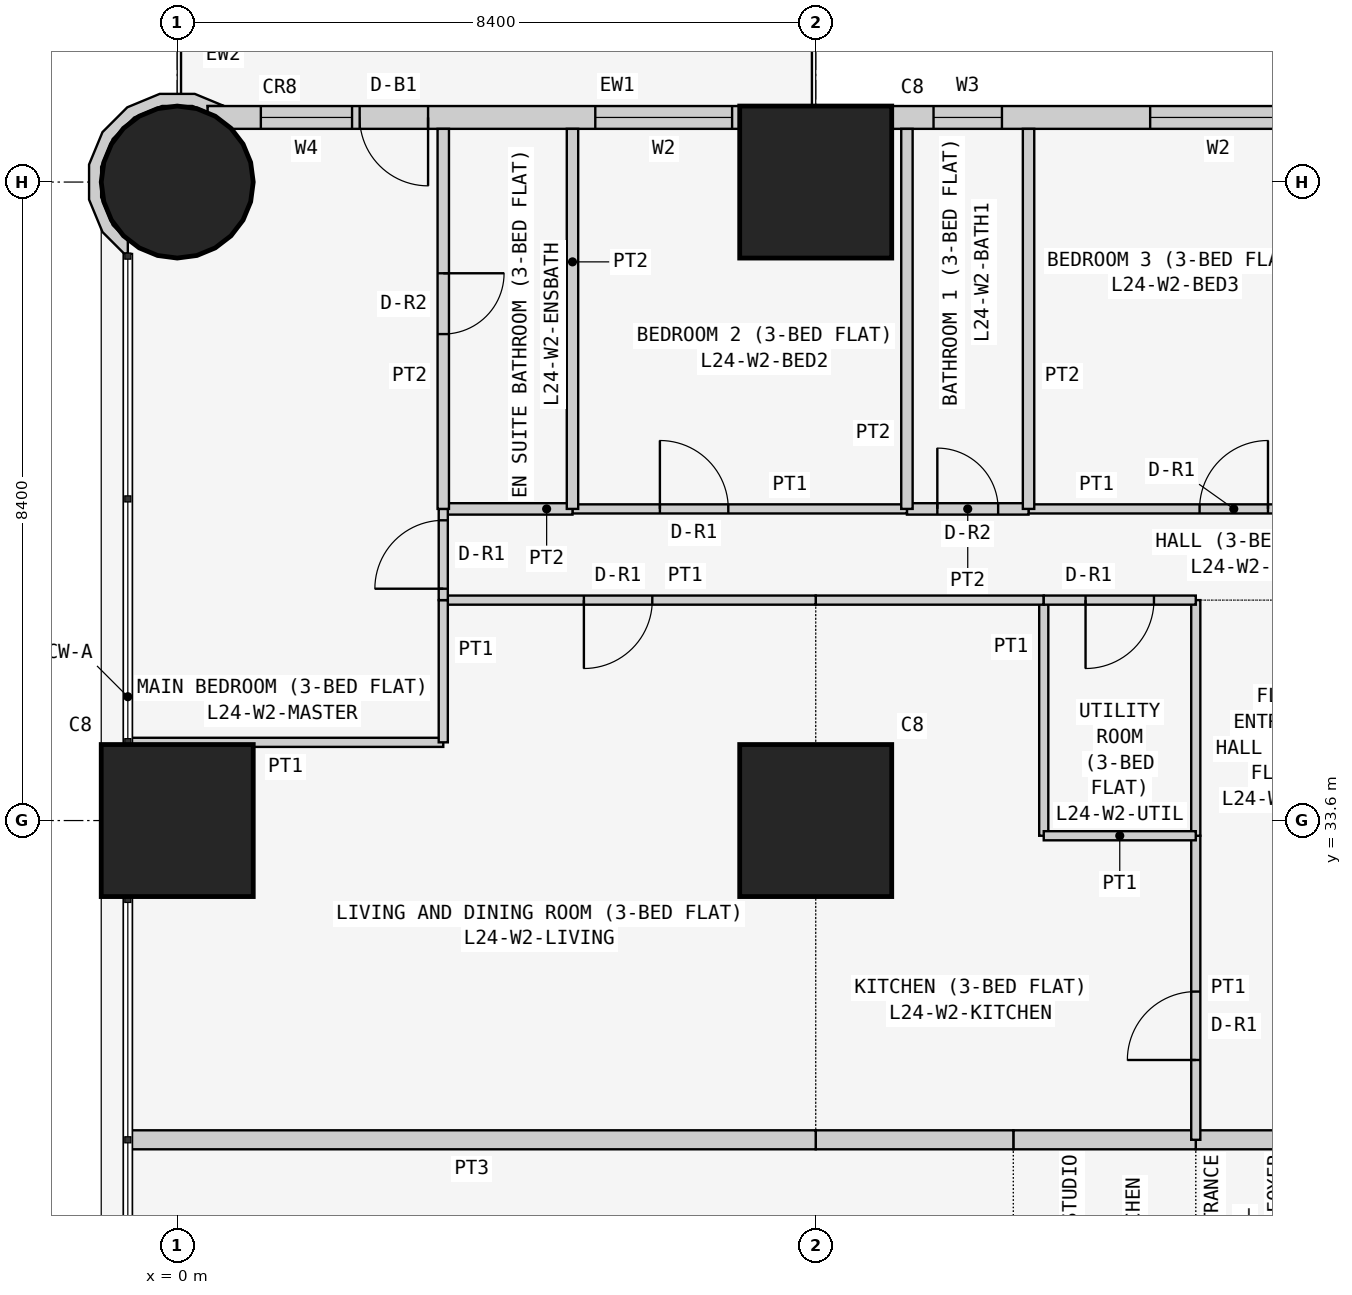
"""IFC4 building model, lengths in metres.
Left out: names, types, materials, properties, quantities, classifications, styles, units other than length and angle.
Written with IfcOpenShell. Run it as: python <this file> out.ifc"""

import sys

from ifc_helpers import new_model, si_unit, direction, frame, frame_2d, origin, origin_2d, place, context, subcontext, project, spatial, polyline, rectangle, circle, outline, extrude, element, fill, save


model = new_model("IFC4")
c1 = context("Model", 3, precision=1e-05, world=origin(), true_north=direction((0.0, 1.0)))
c2 = subcontext(c1, "Body", "Model", "MODEL_VIEW")
j1 = project(units=[si_unit("LENGTHUNIT", "METRE"), si_unit("PLANEANGLEUNIT", "RADIAN")], contexts=[c1])
p1 = place(None, origin())
s1 = spatial("IfcSite", under=j1, at=p1, CompositionType="ELEMENT")
p2 = place(p1, origin())
s2 = spatial("IfcBuilding", under=s1, at=p2, CompositionType="ELEMENT")
p3 = place(p2, frame((0.0, 0.0, 95.7)))
s3 = spatial("IfcBuildingStorey", under=s2, at=p3, CompositionType="ELEMENT", Elevation=95.7)
p4 = place(p3, frame((0.0, 33.6, 0.0), z_axis=(0.0, 0.0, 1.0), x_axis=(1.0, 0.0, 0.0)))
e1 = element("IfcColumn", 1, at=p4, inside=s3, PredefinedType="COLUMN", context=c2, shape_type="SweptSolid", body=[
    extrude(rectangle(XDim=2.0, YDim=2.0, at=origin_2d()), origin(), (0.0, 0.0, 1.0), 3.6),
])
p5 = place(p3, frame((0.0, 42.0, 0.0), z_axis=(0.0, 0.0, 1.0), x_axis=(1.0, 0.0, 0.0)))
e2 = element("IfcColumn", 2, at=p5, inside=s3, PredefinedType="COLUMN", context=c2, shape_type="SweptSolid", body=[
    extrude(circle(Radius=1.0, at=origin_2d()), origin(), (0.0, 0.0, 1.0), 3.6),
])
for number, where, z_axis, x_axis in (
    (3, (8.4, 33.6, 0.0), (0.0, 0.0, 1.0), (1.0, 0.0, 0.0)),
    (4, (8.4, 42.0, 0.0), (0.0, 0.0, 1.0), (1.0, 0.0, 0.0)),
):
    element("IfcColumn", number, at=place(p3, frame(where, z_axis=z_axis, x_axis=x_axis)), inside=s3, PredefinedType="COLUMN", context=c2, shape_type="SweptSolid", body=[
        extrude(rectangle(XDim=2.0, YDim=2.0, at=origin_2d()), origin(), (0.0, 0.0, 1.0), 3.6),
    ])
p6 = place(p3, frame((15.8, 42.85, 0.0), z_axis=(0.0, 0.0, 1.0), x_axis=(-1.0, 0.0, 0.0)))
e5 = element("IfcWall", 5, at=p6, inside=s3, PredefinedType="SOLIDWALL", context=c2, shape_type="SweptSolid", body=[
    extrude(rectangle(XDim=15.4, YDim=0.3, at=frame_2d((7.7, 0.0))), origin(), (0.0, 0.0, 1.0), 3.45),
])
p7 = place(p6, frame((1.2, 0.0, 0.9)))
e6 = element("IfcOpeningElement", 6, at=p7, cuts=e5, PredefinedType="OPENING", context=c2, shape_type="SweptSolid", body=[
    extrude(rectangle(XDim=1.8, YDim=1.5, at=frame_2d((0.9, 0.75))), frame((0.0, 0.16, 0.0), z_axis=(0.0, -1.0, 0.0), x_axis=(1.0, 0.0, 0.0)), (0.0, 0.0, 1.0), 0.32),
])
p8 = place(p6, frame((4.95, 0.0, 1.5)))
e7 = element("IfcOpeningElement", 7, at=p8, cuts=e5, PredefinedType="OPENING", context=c2, shape_type="SweptSolid", body=[
    extrude(rectangle(XDim=0.9, YDim=0.7, at=frame_2d((0.45, 0.35))), frame((0.0, 0.16, 0.0), z_axis=(0.0, -1.0, 0.0), x_axis=(1.0, 0.0, 0.0)), (0.0, 0.0, 1.0), 0.32),
])
p9 = place(p6, frame((8.5, 0.0, 0.9)))
e8 = element("IfcOpeningElement", 8, at=p9, cuts=e5, PredefinedType="OPENING", context=c2, shape_type="SweptSolid", body=[
    extrude(rectangle(XDim=1.8, YDim=1.5, at=frame_2d((0.9, 0.75))), frame((0.0, 0.16, 0.0), z_axis=(0.0, -1.0, 0.0), x_axis=(1.0, 0.0, 0.0)), (0.0, 0.0, 1.0), 0.32),
])
p10 = place(p6, frame((12.5, 0.0, 0.0)))
e9 = element("IfcOpeningElement", 9, at=p10, cuts=e5, PredefinedType="OPENING", context=c2, shape_type="SweptSolid", body=[
    extrude(rectangle(XDim=0.9, YDim=2.4, at=frame_2d((0.45, 1.2))), frame((0.0, 0.16, 0.0), z_axis=(0.0, -1.0, 0.0), x_axis=(1.0, 0.0, 0.0)), (0.0, 0.0, 1.0), 0.32),
])
p11 = place(p6, frame((13.5, 0.0, 0.9)))
e10 = element("IfcOpeningElement", 10, at=p11, cuts=e5, PredefinedType="OPENING", context=c2, shape_type="SweptSolid", body=[
    extrude(rectangle(XDim=1.2, YDim=1.5, at=frame_2d((0.6, 0.75))), frame((0.0, 0.16, 0.0), z_axis=(0.0, -1.0, 0.0), x_axis=(1.0, 0.0, 0.0)), (0.0, 0.0, 1.0), 0.32),
])
p12 = place(p3, frame((0.567, 42.919, 0.0), z_axis=(0.0, 0.0, 1.0), x_axis=(-0.831199417842, 0.555974394895, 0.0)))
e11 = element("IfcWall", 11, at=p12, inside=s3, PredefinedType="SOLIDWALL", context=c2, shape_type="SweptSolid", body=[
    extrude(outline(polyline([(0.004, -0.095), (0.413, -0.013), (0.797, 0.243), (1.053, 0.627), (1.143, 1.08), (1.053, 1.532), (0.796, 1.916), (0.412, 2.172), (0.017, 2.251), (-0.023, 2.224), (0.075, 2.077), (0.351, 2.022), (0.682, 1.801), (0.903, 1.47), (0.981, 1.08), (0.903, 0.689), (0.682, 0.358), (0.351, 0.137), (0.126, 0.092), (0.184, 0.026), (0.004, -0.095)])), origin(), (0.0, 0.0, 1.0), 3.45),
])
p13 = place(p3, frame((15.675, 29.4, 0.0), z_axis=(0.0, 0.0, 1.0), x_axis=(-1.0, 0.0, 0.0)))
e12 = element("IfcWall", 12, at=p13, inside=s3, PredefinedType="PARTITIONING", context=c2, shape_type="SweptSolid", body=[
    extrude(rectangle(XDim=2.275, YDim=0.25, at=frame_2d((1.138, 0.0))), origin(), (0.0, 0.0, 1.0), 3.45),
])
p14 = place(p3, frame((13.4, 29.4, 0.0), z_axis=(0.0, 0.0, 1.0), x_axis=(-1.0, 0.0, 0.0)))
e13 = element("IfcWall", 13, at=p14, inside=s3, PredefinedType="PARTITIONING", context=c2, shape_type="SweptSolid", body=[
    extrude(rectangle(XDim=2.4, YDim=0.25, at=frame_2d((1.2, 0.0))), origin(), (0.0, 0.0, 1.0), 3.45),
])
p15 = place(p3, frame((11.0, 29.4, 0.0), z_axis=(0.0, 0.0, 1.0), x_axis=(-1.0, 0.0, 0.0)))
e14 = element("IfcWall", 14, at=p15, inside=s3, PredefinedType="PARTITIONING", context=c2, shape_type="SweptSolid", body=[
    extrude(rectangle(XDim=2.6, YDim=0.25, at=frame_2d((1.3, 0.0))), origin(), (0.0, 0.0, 1.0), 3.45),
])
p16 = place(p3, frame((8.4, 29.4, 0.0), z_axis=(0.0, 0.0, 1.0), x_axis=(-1.0, 0.0, 0.0)))
e15 = element("IfcWall", 15, at=p16, inside=s3, PredefinedType="PARTITIONING", context=c2, shape_type="SweptSolid", body=[
    extrude(rectangle(XDim=9.05, YDim=0.25, at=frame_2d((4.525, 0.0))), origin(), (0.0, 0.0, 1.0), 3.45),
])
p17 = place(p3, frame((13.4, 29.4, 0.0), z_axis=(0.0, 0.0, 1.0), x_axis=(0.0, 1.0, 0.0)))
e16 = element("IfcWall", 16, at=p17, inside=s3, PredefinedType="PARTITIONING", context=c2, shape_type="SweptSolid", body=[
    extrude(rectangle(XDim=4.0, YDim=0.12, at=frame_2d((2.0, 0.0))), origin(), (0.0, 0.0, 1.0), 3.45),
])
p18 = place(p17, frame((1.05, 0.0, 0.0)))
e17 = element("IfcOpeningElement", 17, at=p18, cuts=e16, PredefinedType="OPENING", context=c2, shape_type="SweptSolid", body=[
    extrude(rectangle(XDim=0.9, YDim=2.1, at=frame_2d((0.45, 1.05))), frame((0.0, 0.07, 0.0), z_axis=(0.0, -1.0, 0.0), x_axis=(1.0, 0.0, 0.0)), (0.0, 0.0, 1.0), 0.14),
])
for number, where, z_axis, x_axis in (
    (18, (13.4, 33.4, 0.0), (0.0, 0.0, 1.0), (0.0, 1.0, 0.0)),
    (19, (11.4, 36.5, 0.0), (0.0, 0.0, 1.0), (0.0, -1.0, 0.0)),
):
    element("IfcWall", number, at=place(p3, frame(where, z_axis=z_axis, x_axis=x_axis)), inside=s3, PredefinedType="PARTITIONING", context=c2, shape_type="SweptSolid", body=[
        extrude(rectangle(XDim=3.1, YDim=0.12, at=frame_2d((1.55, 0.0))), origin(), (0.0, 0.0, 1.0), 3.45),
    ])
p19 = place(p3, frame((11.4, 33.4, 0.0), z_axis=(0.0, 0.0, 1.0), x_axis=(1.0, 0.0, 0.0)))
e20 = element("IfcWall", 20, at=p19, inside=s3, PredefinedType="PARTITIONING", context=c2, shape_type="SweptSolid", body=[
    extrude(rectangle(XDim=2.0, YDim=0.12, at=frame_2d((1.0, 0.0))), origin(), (0.0, 0.0, 1.0), 3.45),
])
p20 = place(p3, frame((8.4, 36.5, 0.0), z_axis=(0.0, 0.0, 1.0), x_axis=(1.0, 0.0, 0.0)))
e21 = element("IfcWall", 21, at=p20, inside=s3, PredefinedType="PARTITIONING", context=c2, shape_type="SweptSolid", body=[
    extrude(rectangle(XDim=3.0, YDim=0.12, at=frame_2d((1.5, 0.0))), origin(), (0.0, 0.0, 1.0), 3.45),
])
p21 = place(p3, frame((11.4, 36.5, 0.0), z_axis=(0.0, 0.0, 1.0), x_axis=(1.0, 0.0, 0.0)))
e22 = element("IfcWall", 22, at=p21, inside=s3, PredefinedType="PARTITIONING", context=c2, shape_type="SweptSolid", body=[
    extrude(rectangle(XDim=2.0, YDim=0.12, at=frame_2d((1.0, 0.0))), origin(), (0.0, 0.0, 1.0), 3.45),
])
p22 = place(p21, frame((0.55, 0.0, 0.0)))
e23 = element("IfcOpeningElement", 23, at=p22, cuts=e22, PredefinedType="OPENING", context=c2, shape_type="SweptSolid", body=[
    extrude(rectangle(XDim=0.9, YDim=2.1, at=frame_2d((0.45, 1.05))), frame((0.0, 0.07, 0.0), z_axis=(0.0, -1.0, 0.0), x_axis=(1.0, 0.0, 0.0)), (0.0, 0.0, 1.0), 0.14),
])
p23 = place(p3, frame((3.5, 36.5, 0.0), z_axis=(0.0, 0.0, 1.0), x_axis=(1.0, 0.0, 0.0)))
e24 = element("IfcWall", 24, at=p23, inside=s3, PredefinedType="PARTITIONING", context=c2, shape_type="SweptSolid", body=[
    extrude(rectangle(XDim=4.9, YDim=0.12, at=frame_2d((2.45, 0.0))), origin(), (0.0, 0.0, 1.0), 3.45),
])
p24 = place(p23, frame((1.85, 0.0, 0.0)))
e25 = element("IfcOpeningElement", 25, at=p24, cuts=e24, PredefinedType="OPENING", context=c2, shape_type="SweptSolid", body=[
    extrude(rectangle(XDim=0.9, YDim=2.1, at=frame_2d((0.45, 1.05))), frame((0.0, 0.07, 0.0), z_axis=(0.0, -1.0, 0.0), x_axis=(1.0, 0.0, 0.0)), (0.0, 0.0, 1.0), 0.14),
])
p25 = place(p3, frame((-0.65, 34.629, 0.0), z_axis=(0.0, 0.0, 1.0), x_axis=(1.0, 0.0, 0.0)))
e26 = element("IfcWall", 26, at=p25, inside=s3, PredefinedType="PARTITIONING", context=c2, shape_type="SweptSolid", body=[
    extrude(rectangle(XDim=4.15, YDim=0.12, at=frame_2d((2.075, 0.0))), origin(), (0.0, 0.0, 1.0), 3.45),
])
p26 = place(p3, frame((3.5, 34.629, 0.0), z_axis=(0.0, 0.0, 1.0), x_axis=(0.0, 1.0, 0.0)))
e27 = element("IfcWall", 27, at=p26, inside=s3, PredefinedType="PARTITIONING", context=c2, shape_type="SweptSolid", body=[
    extrude(rectangle(XDim=1.871, YDim=0.12, at=frame_2d((0.936, 0.0))), origin(), (0.0, 0.0, 1.0), 3.45),
])
p27 = place(p3, frame((11.2, 37.7, 0.0), z_axis=(0.0, 0.0, 1.0), x_axis=(1.0, 0.0, 0.0)))
e28 = element("IfcWall", 28, at=p27, inside=s3, PredefinedType="PARTITIONING", context=c2, shape_type="SweptSolid", body=[
    extrude(rectangle(XDim=4.475, YDim=0.12, at=frame_2d((2.238, 0.0))), origin(), (0.0, 0.0, 1.0), 3.45),
])
p28 = place(p27, frame((2.25, 0.0, 0.0)))
e29 = element("IfcOpeningElement", 29, at=p28, cuts=e28, PredefinedType="OPENING", context=c2, shape_type="SweptSolid", body=[
    extrude(rectangle(XDim=0.9, YDim=2.1, at=frame_2d((0.45, 1.05))), frame((0.0, 0.07, 0.0), z_axis=(0.0, -1.0, 0.0), x_axis=(1.0, 0.0, 0.0)), (0.0, 0.0, 1.0), 0.14),
])
p29 = place(p3, frame((9.6, 37.7, 0.0), z_axis=(0.0, 0.0, 1.0), x_axis=(1.0, 0.0, 0.0)))
e30 = element("IfcWall", 30, at=p29, inside=s3, PredefinedType="PARTITIONING", context=c2, shape_type="SweptSolid", body=[
    extrude(rectangle(XDim=1.6, YDim=0.15, at=frame_2d((0.8, 0.0))), origin(), (0.0, 0.0, 1.0), 3.45),
])
p30 = place(p29, frame((0.4, 0.0, 0.0)))
e31 = element("IfcOpeningElement", 31, at=p30, cuts=e30, PredefinedType="OPENING", context=c2, shape_type="SweptSolid", body=[
    extrude(rectangle(XDim=0.8, YDim=2.1, at=frame_2d((0.4, 1.05))), frame((0.0, 0.085, 0.0), z_axis=(0.0, -1.0, 0.0), x_axis=(1.0, 0.0, 0.0)), (0.0, 0.0, 1.0), 0.17),
])
p31 = place(p3, frame((5.2, 37.7, 0.0), z_axis=(0.0, 0.0, 1.0), x_axis=(1.0, 0.0, 0.0)))
e32 = element("IfcWall", 32, at=p31, inside=s3, PredefinedType="PARTITIONING", context=c2, shape_type="SweptSolid", body=[
    extrude(rectangle(XDim=4.4, YDim=0.12, at=frame_2d((2.2, 0.0))), origin(), (0.0, 0.0, 1.0), 3.45),
])
p32 = place(p31, frame((1.15, 0.0, 0.0)))
e33 = element("IfcOpeningElement", 33, at=p32, cuts=e32, PredefinedType="OPENING", context=c2, shape_type="SweptSolid", body=[
    extrude(rectangle(XDim=0.9, YDim=2.1, at=frame_2d((0.45, 1.05))), frame((0.0, 0.07, 0.0), z_axis=(0.0, -1.0, 0.0), x_axis=(1.0, 0.0, 0.0)), (0.0, 0.0, 1.0), 0.14),
])
p33 = place(p3, frame((3.5, 37.7, 0.0), z_axis=(0.0, 0.0, 1.0), x_axis=(1.0, 0.0, 0.0)))
e34 = element("IfcWall", 34, at=p33, inside=s3, PredefinedType="PARTITIONING", context=c2, shape_type="SweptSolid", body=[
    extrude(rectangle(XDim=1.7, YDim=0.15, at=frame_2d((0.85, 0.0))), origin(), (0.0, 0.0, 1.0), 3.45),
])
p34 = place(p3, frame((3.5, 36.5, 0.0), z_axis=(0.0, 0.0, 1.0), x_axis=(0.0, 1.0, 0.0)))
e35 = element("IfcWall", 35, at=p34, inside=s3, PredefinedType="PARTITIONING", context=c2, shape_type="SweptSolid", body=[
    extrude(rectangle(XDim=1.2, YDim=0.12, at=frame_2d((0.6, 0.0))), origin(), (0.0, 0.0, 1.0), 3.45),
])
p35 = place(p34, frame((0.15, 0.0, 0.0)))
e36 = element("IfcOpeningElement", 36, at=p35, cuts=e35, PredefinedType="OPENING", context=c2, shape_type="SweptSolid", body=[
    extrude(rectangle(XDim=0.9, YDim=2.1, at=frame_2d((0.45, 1.05))), frame((0.0, 0.07, 0.0), z_axis=(0.0, -1.0, 0.0), x_axis=(1.0, 0.0, 0.0)), (0.0, 0.0, 1.0), 0.14),
])
for number, where, z_axis, x_axis in (
    (37, (11.2, 37.7, 0.0), (0.0, 0.0, 1.0), (0.0, 1.0, 0.0)),
    (38, (9.6, 37.7, 0.0), (0.0, 0.0, 1.0), (0.0, 1.0, 0.0)),
    (39, (5.2, 37.7, 0.0), (0.0, 0.0, 1.0), (0.0, 1.0, 0.0)),
):
    element("IfcWall", number, at=place(p3, frame(where, z_axis=z_axis, x_axis=x_axis)), inside=s3, PredefinedType="PARTITIONING", context=c2, shape_type="SweptSolid", body=[
        extrude(rectangle(XDim=5.0, YDim=0.15, at=frame_2d((2.5, 0.0))), origin(), (0.0, 0.0, 1.0), 3.45),
    ])
p36 = place(p3, frame((3.5, 37.7, 0.0), z_axis=(0.0, 0.0, 1.0), x_axis=(0.0, 1.0, 0.0)))
e40 = element("IfcWall", 40, at=p36, inside=s3, PredefinedType="PARTITIONING", context=c2, shape_type="SweptSolid", body=[
    extrude(rectangle(XDim=5.0, YDim=0.15, at=frame_2d((2.5, 0.0))), origin(), (0.0, 0.0, 1.0), 3.45),
])
p37 = place(p36, frame((2.3, 0.0, 0.0)))
e41 = element("IfcOpeningElement", 41, at=p37, cuts=e40, PredefinedType="OPENING", context=c2, shape_type="SweptSolid", body=[
    extrude(rectangle(XDim=0.8, YDim=2.1, at=frame_2d((0.4, 1.05))), frame((0.0, 0.085, 0.0), z_axis=(0.0, -1.0, 0.0), x_axis=(1.0, 0.0, 0.0)), (0.0, 0.0, 1.0), 0.17),
])
p38 = place(p7, origin())
e42 = element("IfcWindow", 42, at=p38, inside=s3, PartitioningType="SINGLE_PANEL", PredefinedType="WINDOW", context=c2, shape_type="SweptSolid", body=[
    extrude(rectangle(XDim=1.8, YDim=1.5, at=frame_2d((0.9, 0.75))), frame((0.0, 0.03, 0.0), z_axis=(0.0, -1.0, 0.0), x_axis=(1.0, 0.0, 0.0)), (0.0, 0.0, 1.0), 0.06),
])
fill(e6, e42)
p39 = place(p8, origin())
e43 = element("IfcWindow", 43, at=p39, inside=s3, PartitioningType="SINGLE_PANEL", PredefinedType="WINDOW", context=c2, shape_type="SweptSolid", body=[
    extrude(rectangle(XDim=0.9, YDim=0.7, at=frame_2d((0.45, 0.35))), frame((0.0, 0.03, 0.0), z_axis=(0.0, -1.0, 0.0), x_axis=(1.0, 0.0, 0.0)), (0.0, 0.0, 1.0), 0.06),
])
fill(e7, e43)
p40 = place(p9, origin())
e44 = element("IfcWindow", 44, at=p40, inside=s3, PartitioningType="SINGLE_PANEL", PredefinedType="WINDOW", context=c2, shape_type="SweptSolid", body=[
    extrude(rectangle(XDim=1.8, YDim=1.5, at=frame_2d((0.9, 0.75))), frame((0.0, 0.03, 0.0), z_axis=(0.0, -1.0, 0.0), x_axis=(1.0, 0.0, 0.0)), (0.0, 0.0, 1.0), 0.06),
])
fill(e8, e44)
p41 = place(p10, origin())
e45 = element("IfcDoor", 45, at=p41, inside=s3, OperationType="SINGLE_SWING_LEFT", PredefinedType="DOOR", context=c2, shape_type="SweptSolid", body=[
    extrude(rectangle(XDim=0.9, YDim=2.4, at=frame_2d((0.45, 1.2))), frame((0.0, 0.025, 0.0), z_axis=(0.0, -1.0, 0.0), x_axis=(1.0, 0.0, 0.0)), (0.0, 0.0, 1.0), 0.05),
])
fill(e9, e45)
p42 = place(p11, origin())
e46 = element("IfcWindow", 46, at=p42, inside=s3, PartitioningType="SINGLE_PANEL", PredefinedType="WINDOW", context=c2, shape_type="SweptSolid", body=[
    extrude(rectangle(XDim=1.2, YDim=1.5, at=frame_2d((0.6, 0.75))), frame((0.0, 0.03, 0.0), z_axis=(0.0, -1.0, 0.0), x_axis=(1.0, 0.0, 0.0)), (0.0, 0.0, 1.0), 0.06),
])
fill(e10, e46)
p43 = place(p18, origin())
e47 = element("IfcDoor", 47, at=p43, inside=s3, OperationType="SINGLE_SWING_LEFT", PredefinedType="DOOR", context=c2, shape_type="SweptSolid", body=[
    extrude(rectangle(XDim=0.9, YDim=2.1, at=frame_2d((0.45, 1.05))), frame((0.0, 0.025, 0.0), z_axis=(0.0, -1.0, 0.0), x_axis=(1.0, 0.0, 0.0)), (0.0, 0.0, 1.0), 0.05),
])
fill(e17, e47)
p44 = place(p22, frame((0.9, 0.0, 0.0), z_axis=(0.0, 0.0, 1.0), x_axis=(-1.0, 0.0, 0.0)))
e48 = element("IfcDoor", 48, at=p44, inside=s3, OperationType="SINGLE_SWING_RIGHT", PredefinedType="DOOR", context=c2, shape_type="SweptSolid", body=[
    extrude(rectangle(XDim=0.9, YDim=2.1, at=frame_2d((0.45, 1.05))), frame((0.0, 0.025, 0.0), z_axis=(0.0, -1.0, 0.0), x_axis=(1.0, 0.0, 0.0)), (0.0, 0.0, 1.0), 0.05),
])
fill(e23, e48)
p45 = place(p24, frame((0.9, 0.0, 0.0), z_axis=(0.0, 0.0, 1.0), x_axis=(-1.0, 0.0, 0.0)))
e49 = element("IfcDoor", 49, at=p45, inside=s3, OperationType="SINGLE_SWING_RIGHT", PredefinedType="DOOR", context=c2, shape_type="SweptSolid", body=[
    extrude(rectangle(XDim=0.9, YDim=2.1, at=frame_2d((0.45, 1.05))), frame((0.0, 0.025, 0.0), z_axis=(0.0, -1.0, 0.0), x_axis=(1.0, 0.0, 0.0)), (0.0, 0.0, 1.0), 0.05),
])
fill(e25, e49)
p46 = place(p28, origin())
e50 = element("IfcDoor", 50, at=p46, inside=s3, OperationType="SINGLE_SWING_RIGHT", PredefinedType="DOOR", context=c2, shape_type="SweptSolid", body=[
    extrude(rectangle(XDim=0.9, YDim=2.1, at=frame_2d((0.45, 1.05))), frame((0.0, 0.025, 0.0), z_axis=(0.0, -1.0, 0.0), x_axis=(1.0, 0.0, 0.0)), (0.0, 0.0, 1.0), 0.05),
])
fill(e29, e50)
p47 = place(p30, origin())
e51 = element("IfcDoor", 51, at=p47, inside=s3, OperationType="SINGLE_SWING_LEFT", PredefinedType="DOOR", context=c2, shape_type="SweptSolid", body=[
    extrude(rectangle(XDim=0.8, YDim=2.1, at=frame_2d((0.4, 1.05))), frame((0.0, 0.025, 0.0), z_axis=(0.0, -1.0, 0.0), x_axis=(1.0, 0.0, 0.0)), (0.0, 0.0, 1.0), 0.05),
])
fill(e31, e51)
p48 = place(p32, origin())
e52 = element("IfcDoor", 52, at=p48, inside=s3, OperationType="SINGLE_SWING_LEFT", PredefinedType="DOOR", context=c2, shape_type="SweptSolid", body=[
    extrude(rectangle(XDim=0.9, YDim=2.1, at=frame_2d((0.45, 1.05))), frame((0.0, 0.025, 0.0), z_axis=(0.0, -1.0, 0.0), x_axis=(1.0, 0.0, 0.0)), (0.0, 0.0, 1.0), 0.05),
])
fill(e33, e52)
p49 = place(p35, origin())
e53 = element("IfcDoor", 53, at=p49, inside=s3, OperationType="SINGLE_SWING_LEFT", PredefinedType="DOOR", context=c2, shape_type="SweptSolid", body=[
    extrude(rectangle(XDim=0.9, YDim=2.1, at=frame_2d((0.45, 1.05))), frame((0.0, 0.025, 0.0), z_axis=(0.0, -1.0, 0.0), x_axis=(1.0, 0.0, 0.0)), (0.0, 0.0, 1.0), 0.05),
])
fill(e36, e53)
p50 = place(p37, frame((0.8, 0.0, 0.0), z_axis=(0.0, 0.0, 1.0), x_axis=(-1.0, 0.0, 0.0)))
e54 = element("IfcDoor", 54, at=p50, inside=s3, OperationType="SINGLE_SWING_LEFT", PredefinedType="DOOR", context=c2, shape_type="SweptSolid", body=[
    extrude(rectangle(XDim=0.8, YDim=2.1, at=frame_2d((0.4, 1.05))), frame((0.0, 0.025, 0.0), z_axis=(0.0, -1.0, 0.0), x_axis=(1.0, 0.0, 0.0)), (0.0, 0.0, 1.0), 0.05),
])
fill(e41, e54)
save(model, sys.argv[1])
